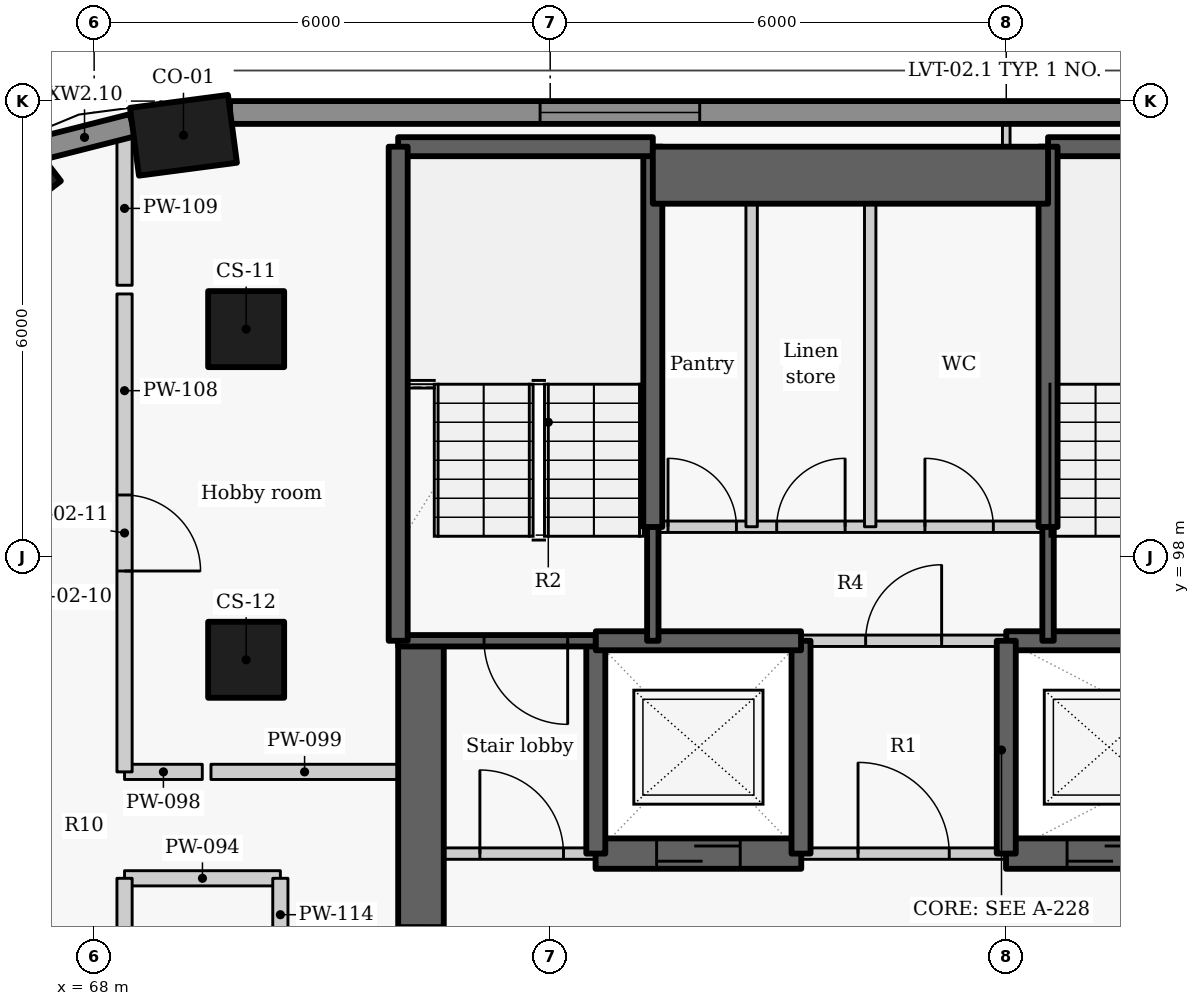
"""IFC4 building model, lengths in metres.
Left out: names, types, materials, properties, quantities, classifications, styles, units other than length and angle.
Written with IfcOpenShell. Run it as: python <this file> out.ifc"""

import sys

from ifc_helpers import new_model, si_unit, direction, frame, frame_2d, origin, origin_2d, place, context, subcontext, project, spatial, rectangle, extrude, element, fill, save


model = new_model("IFC4")
c1 = context("Model", 3, precision=1e-05, world=origin(), true_north=direction((0.0, 1.0)))
c2 = subcontext(c1, "Body", "Model", "MODEL_VIEW")
j1 = project(units=[si_unit("LENGTHUNIT", "METRE"), si_unit("PLANEANGLEUNIT", "RADIAN")], contexts=[c1])
p1 = place(None, origin())
s1 = spatial("IfcSite", under=j1, at=p1, CompositionType="ELEMENT")
p2 = place(p1, origin())
s2 = spatial("IfcBuilding", under=s1, at=p2, CompositionType="ELEMENT")
p3 = place(p2, frame((0.0, 0.0, 160.2)))
s3 = spatial("IfcBuildingStorey", under=s2, at=p3, CompositionType="ELEMENT", Elevation=160.2)
for number, where, z_axis, x_axis in (
    (1, (69.175, 103.55, 0.0), (0.0, 0.0, 1.0), (-0.991, -0.131, 0.0)),
    (2, (66.773, 102.91, 0.0), (0.0, 0.0, 1.0), (-0.793, -0.609, 0.0)),
):
    element("IfcColumn", number, at=place(p3, frame(where, z_axis=z_axis, x_axis=x_axis)), inside=s3, PredefinedType="COLUMN", context=c2, shape_type="SweptSolid", body=[
        extrude(rectangle(XDim=1.3, YDim=0.9, at=origin_2d()), origin(), (0.0, 0.0, 1.0), 3.3),
    ])
for number, where, z_axis, x_axis in (
    (3, (70.0, 101.0, 0.0), (0.0, 0.0, 1.0), (0.0, -1.0, 0.0)),
    (4, (70.0, 96.65, 0.0), (0.0, 0.0, 1.0), (0.0, -1.0, 0.0)),
):
    element("IfcColumn", number, at=place(p3, frame(where, z_axis=z_axis, x_axis=x_axis)), inside=s3, PredefinedType="COLUMN", context=c2, shape_type="SweptSolid", body=[
        extrude(rectangle(XDim=1.0, YDim=1.0, at=origin_2d()), origin(), (0.0, 0.0, 1.0), 3.3),
    ])
p4 = place(p3, frame((90.179, 103.85, 0.0), z_axis=(0.0, 0.0, 1.0), x_axis=(-1.0, 0.0, 0.0)))
e5 = element("IfcWall", 5, at=p4, inside=s3, PredefinedType="SOLIDWALL", context=c2, shape_type="SweptSolid", body=[
    extrude(rectangle(XDim=20.391, YDim=0.3, at=frame_2d((10.196, 0.0))), origin(), (0.0, 0.0, 1.0), 2.425),
])
p5 = place(p4, frame((4.051, 0.0, 0.9)))
e6 = element("IfcOpeningElement", 6, at=p5, cuts=e5, PredefinedType="OPENING", context=c2, shape_type="SweptSolid", body=[
    extrude(rectangle(XDim=2.1, YDim=1.1, at=frame_2d((1.05, 0.55))), frame((0.0, 0.16, 0.0), z_axis=(0.0, -1.0, 0.0), x_axis=(1.0, 0.0, 0.0)), (0.0, 0.0, 1.0), 0.32),
])
p6 = place(p4, frame((14.212, 0.0, 0.9)))
e7 = element("IfcOpeningElement", 7, at=p6, cuts=e5, PredefinedType="OPENING", context=c2, shape_type="SweptSolid", body=[
    extrude(rectangle(XDim=2.1, YDim=1.1, at=frame_2d((1.05, 0.55))), frame((0.0, 0.16, 0.0), z_axis=(0.0, -1.0, 0.0), x_axis=(1.0, 0.0, 0.0)), (0.0, 0.0, 1.0), 0.32),
])
p7 = place(p3, frame((68.506, 103.683, 0.0), z_axis=(0.0, 0.0, 1.0), x_axis=(-0.96924493129, -0.246098076322, 0.0)))
e8 = element("IfcWall", 8, at=p7, inside=s3, PredefinedType="SOLIDWALL", context=c2, shape_type="SweptSolid", body=[
    extrude(rectangle(XDim=1.305, YDim=0.3, at=frame_2d((0.653, 0.0))), origin(), (0.0, 0.0, 1.0), 2.425),
])
p8 = place(p3, frame((72.3, 87.8, -0.275), z_axis=(0.0, 0.0, 1.0), x_axis=(0.0, 1.0, 0.0)))
e9 = element("IfcWall", 9, at=p8, inside=s3, PredefinedType="SHEAR", context=c2, shape_type="SweptSolid", body=[
    extrude(rectangle(XDim=9.1, YDim=0.6, at=frame_2d((4.55, 0.0))), origin(), (0.0, 0.0, 1.0), 3.3),
])
p9 = place(p8, frame((3.852, 0.0, 0.275)))
e10 = element("IfcOpeningElement", 10, at=p9, cuts=e9, PredefinedType="OPENING", context=c2, shape_type="SweptSolid", body=[
    extrude(rectangle(XDim=1.5, YDim=2.1, at=frame_2d((0.75, 1.05))), frame((0.0, 0.31, 0.0), z_axis=(0.0, -1.0, 0.0), x_axis=(1.0, 0.0, 0.0)), (0.0, 0.0, 1.0), 0.62),
])
p10 = place(p3, frame((72.0, 94.1, 0.0), z_axis=(0.0, 0.0, 1.0), x_axis=(1.0, 0.0, 0.0)))
e11 = element("IfcWall", 11, at=p10, inside=s3, PredefinedType="PARTITIONING", context=c2, shape_type="SweptSolid", body=[
    extrude(rectangle(XDim=2.603, YDim=0.15, at=frame_2d((1.302, 0.0))), origin(), (0.0, 0.0, 1.0), 3.025),
])
p11 = place(p10, frame((1.075, 0.0, 0.0)))
e12 = element("IfcOpeningElement", 12, at=p11, cuts=e11, PredefinedType="OPENING", context=c2, shape_type="SweptSolid", body=[
    extrude(rectangle(XDim=1.1, YDim=2.1, at=frame_2d((0.55, 1.05))), frame((0.0, 0.085, 0.0), z_axis=(0.0, -1.0, 0.0), x_axis=(1.0, 0.0, 0.0)), (0.0, 0.0, 1.0), 0.17),
])
p12 = place(p3, frame((77.297, 94.1, 0.0), z_axis=(0.0, 0.0, 1.0), x_axis=(1.0, 0.0, 0.0)))
e13 = element("IfcWall", 13, at=p12, inside=s3, PredefinedType="PARTITIONING", context=c2, shape_type="SweptSolid", body=[
    extrude(rectangle(XDim=2.706, YDim=0.15, at=frame_2d((1.353, 0.0))), origin(), (0.0, 0.0, 1.0), 3.025),
])
p13 = place(p12, frame((0.753, 0.0, 0.0)))
e14 = element("IfcOpeningElement", 14, at=p13, cuts=e13, PredefinedType="OPENING", context=c2, shape_type="SweptSolid", body=[
    extrude(rectangle(XDim=1.2, YDim=2.1, at=frame_2d((0.6, 1.05))), frame((0.0, 0.085, 0.0), z_axis=(0.0, -1.0, 0.0), x_axis=(1.0, 0.0, 0.0)), (0.0, 0.0, 1.0), 0.17),
])
p14 = place(p3, frame((74.597, 94.1, -0.275), z_axis=(0.0, 0.0, 1.0), x_axis=(1.0, 0.0, 0.0)))
e15 = element("IfcWall", 15, at=p14, inside=s3, PredefinedType="SHEAR", context=c2, shape_type="SweptSolid", body=[
    extrude(rectangle(XDim=2.706, YDim=0.4, at=frame_2d((1.353, 0.0))), origin(), (0.0, 0.0, 1.0), 3.3),
])
p15 = place(p14, frame((0.803, 0.0, 0.275)))
e16 = element("IfcOpeningElement", 16, at=p15, cuts=e15, PredefinedType="OPENING", context=c2, shape_type="SweptSolid", body=[
    extrude(rectangle(XDim=1.1, YDim=2.1, at=frame_2d((0.55, 1.05))), frame((0.0, 0.21, 0.0), z_axis=(0.0, -1.0, 0.0), x_axis=(1.0, 0.0, 0.0)), (0.0, 0.0, 1.0), 0.42),
])
p16 = place(p3, frame((79.997, 94.1, -0.275), z_axis=(0.0, 0.0, 1.0), x_axis=(1.0, 0.0, 0.0)))
e17 = element("IfcWall", 17, at=p16, inside=s3, PredefinedType="SHEAR", context=c2, shape_type="SweptSolid", body=[
    extrude(rectangle(XDim=5.406, YDim=0.4, at=frame_2d((2.703, 0.0))), origin(), (0.0, 0.0, 1.0), 3.3),
])
p17 = place(p16, frame((0.803, 0.0, 0.275)))
e18 = element("IfcOpeningElement", 18, at=p17, cuts=e17, PredefinedType="OPENING", context=c2, shape_type="SweptSolid", body=[
    extrude(rectangle(XDim=1.1, YDim=2.1, at=frame_2d((0.55, 1.05))), frame((0.0, 0.21, 0.0), z_axis=(0.0, -1.0, 0.0), x_axis=(1.0, 0.0, 0.0)), (0.0, 0.0, 1.0), 0.42),
])
p18 = place(p3, frame((74.6, 94.1, -0.275), z_axis=(0.0, 0.0, 1.0), x_axis=(0.0, 1.0, 0.0)))
e19 = element("IfcWall", 19, at=p18, inside=s3, PredefinedType="SHEAR", context=c2, shape_type="SweptSolid", body=[
    extrude(rectangle(XDim=2.8, YDim=0.25, at=frame_2d((1.4, 0.0))), origin(), (0.0, 0.0, 1.0), 3.3),
])
p19 = place(p3, frame((74.6, 96.9, -0.275), z_axis=(0.0, 0.0, 1.0), x_axis=(-1.0, 0.0, 0.0)))
e20 = element("IfcWall", 20, at=p19, inside=s3, PredefinedType="SHEAR", context=c2, shape_type="SweptSolid", body=[
    extrude(rectangle(XDim=2.6, YDim=0.15, at=frame_2d((1.3, 0.0))), origin(), (0.0, 0.0, 1.0), 3.3),
])
p20 = place(p19, frame((0.37, 0.0, 0.275)))
e21 = element("IfcOpeningElement", 21, at=p20, cuts=e20, PredefinedType="OPENING", context=c2, shape_type="SweptSolid", body=[
    extrude(rectangle(XDim=1.1, YDim=2.1, at=frame_2d((0.55, 1.05))), frame((0.0, 0.085, 0.0), z_axis=(0.0, -1.0, 0.0), x_axis=(1.0, 0.0, 0.0)), (0.0, 0.0, 1.0), 0.17),
])
p21 = place(p3, frame((77.3, 94.1, -0.275), z_axis=(0.0, 0.0, 1.0), x_axis=(0.0, 1.0, 0.0)))
e22 = element("IfcWall", 22, at=p21, inside=s3, PredefinedType="SHEAR", context=c2, shape_type="SweptSolid", body=[
    extrude(rectangle(XDim=2.8, YDim=0.25, at=frame_2d((1.4, 0.0))), origin(), (0.0, 0.0, 1.0), 3.3),
])
p22 = place(p3, frame((74.6, 96.9, -0.275), z_axis=(0.0, 0.0, 1.0), x_axis=(1.0, 0.0, 0.0)))
e23 = element("IfcWall", 23, at=p22, inside=s3, PredefinedType="SHEAR", context=c2, shape_type="SweptSolid", body=[
    extrude(rectangle(XDim=2.7, YDim=0.25, at=frame_2d((1.35, 0.0))), origin(), (0.0, 0.0, 1.0), 3.3),
])
p23 = place(p3, frame((80.0, 96.9, -0.275), z_axis=(0.0, 0.0, 1.0), x_axis=(1.0, 0.0, 0.0)))
e24 = element("IfcWall", 24, at=p23, inside=s3, PredefinedType="SHEAR", context=c2, shape_type="SweptSolid", body=[
    extrude(rectangle(XDim=8.0, YDim=0.25, at=frame_2d((4.0, 0.0))), origin(), (0.0, 0.0, 1.0), 3.3),
])
p24 = place(p23, frame((3.849, 0.0, 0.275)))
e25 = element("IfcOpeningElement", 25, at=p24, cuts=e24, PredefinedType="OPENING", context=c2, shape_type="SweptSolid", body=[
    extrude(rectangle(XDim=1.1, YDim=2.1, at=frame_2d((0.55, 1.05))), frame((0.0, 0.135, 0.0), z_axis=(0.0, -1.0, 0.0), x_axis=(1.0, 0.0, 0.0)), (0.0, 0.0, 1.0), 0.27),
])
p25 = place(p3, frame((80.0, 94.1, -0.275), z_axis=(0.0, 0.0, 1.0), x_axis=(0.0, 1.0, 0.0)))
e26 = element("IfcWall", 26, at=p25, inside=s3, PredefinedType="SHEAR", context=c2, shape_type="SweptSolid", body=[
    extrude(rectangle(XDim=2.8, YDim=0.25, at=frame_2d((1.4, 0.0))), origin(), (0.0, 0.0, 1.0), 3.3),
])
p26 = place(p3, frame((77.3, 96.9, 0.0), z_axis=(0.0, 0.0, 1.0), x_axis=(1.0, 0.0, 0.0)))
e27 = element("IfcWall", 27, at=p26, inside=s3, PredefinedType="PARTITIONING", context=c2, shape_type="SweptSolid", body=[
    extrude(rectangle(XDim=2.7, YDim=0.15, at=frame_2d((1.35, 0.0))), origin(), (0.0, 0.0, 1.0), 3.025),
])
p27 = place(p26, frame((0.85, 0.0, 0.0)))
e28 = element("IfcOpeningElement", 28, at=p27, cuts=e27, PredefinedType="OPENING", context=c2, shape_type="SweptSolid", body=[
    extrude(rectangle(XDim=1.0, YDim=2.1, at=frame_2d((0.5, 1.05))), frame((0.0, 0.085, 0.0), z_axis=(0.0, -1.0, 0.0), x_axis=(1.0, 0.0, 0.0)), (0.0, 0.0, 1.0), 0.17),
])
p28 = place(p3, frame((75.35, 96.9, -0.275), z_axis=(0.0, 0.0, 1.0), x_axis=(0.0, 1.0, 0.0)))
e29 = element("IfcWall", 29, at=p28, inside=s3, PredefinedType="SHEAR", context=c2, shape_type="SweptSolid", body=[
    extrude(rectangle(XDim=1.503, YDim=0.15, at=frame_2d((0.751, 0.0))), origin(), (0.0, 0.0, 1.0), 3.3),
])
p29 = place(p3, frame((75.35, 98.397, -0.275), z_axis=(0.0, 0.0, 1.0), x_axis=(0.0, 1.0, 0.0)))
e30 = element("IfcWall", 30, at=p29, inside=s3, PredefinedType="SHEAR", context=c2, shape_type="SweptSolid", body=[
    extrude(rectangle(XDim=5.003, YDim=0.25, at=frame_2d((2.501, 0.0))), origin(), (0.0, 0.0, 1.0), 3.3),
])
p30 = place(p3, frame((72.0, 103.4, -0.275), z_axis=(0.0, 0.0, 1.0), x_axis=(1.0, 0.0, 0.0)))
e31 = element("IfcWall", 31, at=p30, inside=s3, PredefinedType="SHEAR", context=c2, shape_type="SweptSolid", body=[
    extrude(rectangle(XDim=3.35, YDim=0.25, at=frame_2d((1.675, 0.0))), origin(), (0.0, 0.0, 1.0), 3.3),
])
p31 = place(p3, frame((80.55, 103.4, -0.275), z_axis=(0.0, 0.0, 1.0), x_axis=(1.0, 0.0, 0.0)))
e32 = element("IfcWall", 32, at=p31, inside=s3, PredefinedType="SHEAR", context=c2, shape_type="SweptSolid", body=[
    extrude(rectangle(XDim=2.85, YDim=0.25, at=frame_2d((1.425, 0.0))), origin(), (0.0, 0.0, 1.0), 3.3),
])
p32 = place(p3, frame((72.0, 96.9, -0.275), z_axis=(0.0, 0.0, 1.0), x_axis=(0.0, 1.0, 0.0)))
e33 = element("IfcWall", 33, at=p32, inside=s3, PredefinedType="SHEAR", context=c2, shape_type="SweptSolid", body=[
    extrude(rectangle(XDim=6.5, YDim=0.25, at=frame_2d((3.25, 0.0))), origin(), (0.0, 0.0, 1.0), 3.3),
])
p33 = place(p3, frame((80.55, 96.9, -0.275), z_axis=(0.0, 0.0, 1.0), x_axis=(0.0, 1.0, 0.0)))
e34 = element("IfcWall", 34, at=p33, inside=s3, PredefinedType="SHEAR", context=c2, shape_type="SweptSolid", body=[
    extrude(rectangle(XDim=1.503, YDim=0.15, at=frame_2d((0.751, 0.0))), origin(), (0.0, 0.0, 1.0), 3.3),
])
p34 = place(p3, frame((80.55, 98.397, -0.275), z_axis=(0.0, 0.0, 1.0), x_axis=(0.0, 1.0, 0.0)))
e35 = element("IfcWall", 35, at=p34, inside=s3, PredefinedType="SHEAR", context=c2, shape_type="SweptSolid", body=[
    extrude(rectangle(XDim=5.003, YDim=0.25, at=frame_2d((2.501, 0.0))), origin(), (0.0, 0.0, 1.0), 3.3),
])
p35 = place(p3, frame((75.35, 103.025, -0.275), z_axis=(0.0, 0.0, 1.0), x_axis=(1.0, 0.0, 0.0)))
e36 = element("IfcWall", 36, at=p35, inside=s3, PredefinedType="SHEAR", context=c2, shape_type="SweptSolid", body=[
    extrude(rectangle(XDim=5.2, YDim=0.75, at=frame_2d((2.6, 0.0))), origin(), (0.0, 0.0, 1.0), 3.3),
])
p36 = place(p3, frame((75.35, 98.4, 0.0), z_axis=(0.0, 0.0, 1.0), x_axis=(1.0, 0.0, 0.0)))
e37 = element("IfcWall", 37, at=p36, inside=s3, PredefinedType="PARTITIONING", context=c2, shape_type="SweptSolid", body=[
    extrude(rectangle(XDim=5.2, YDim=0.15, at=frame_2d((2.6, 0.0))), origin(), (0.0, 0.0, 1.0), 3.025),
])
p37 = place(p36, frame((0.2, 0.0, 0.0)))
e38 = element("IfcOpeningElement", 38, at=p37, cuts=e37, PredefinedType="OPENING", context=c2, shape_type="SweptSolid", body=[
    extrude(rectangle(XDim=0.9, YDim=2.1, at=frame_2d((0.45, 1.05))), frame((0.0, 0.085, 0.0), z_axis=(0.0, -1.0, 0.0), x_axis=(1.0, 0.0, 0.0)), (0.0, 0.0, 1.0), 0.17),
])
p38 = place(p36, frame((1.63, 0.0, 0.0)))
e39 = element("IfcOpeningElement", 39, at=p38, cuts=e37, PredefinedType="OPENING", context=c2, shape_type="SweptSolid", body=[
    extrude(rectangle(XDim=0.9, YDim=2.1, at=frame_2d((0.45, 1.05))), frame((0.0, 0.085, 0.0), z_axis=(0.0, -1.0, 0.0), x_axis=(1.0, 0.0, 0.0)), (0.0, 0.0, 1.0), 0.17),
])
p39 = place(p36, frame((3.58, 0.0, 0.0)))
e40 = element("IfcOpeningElement", 40, at=p39, cuts=e37, PredefinedType="OPENING", context=c2, shape_type="SweptSolid", body=[
    extrude(rectangle(XDim=0.9, YDim=2.1, at=frame_2d((0.45, 1.05))), frame((0.0, 0.085, 0.0), z_axis=(0.0, -1.0, 0.0), x_axis=(1.0, 0.0, 0.0)), (0.0, 0.0, 1.0), 0.17),
])
for number, where, z_axis, x_axis in (
    (41, (76.65, 98.4, 0.0), (0.0, 0.0, 1.0), (0.0, 1.0, 0.0)),
    (42, (78.21, 98.4, 0.0), (0.0, 0.0, 1.0), (0.0, 1.0, 0.0)),
):
    element("IfcWall", number, at=place(p3, frame(where, z_axis=z_axis, x_axis=x_axis)), inside=s3, PredefinedType="PARTITIONING", context=c2, shape_type="SweptSolid", body=[
        extrude(rectangle(XDim=5.0, YDim=0.15, at=frame_2d((2.5, 0.0))), origin(), (0.0, 0.0, 1.0), 3.025),
    ])
p40 = place(p3, frame((68.4, 93.775, 0.0), z_axis=(0.0, 0.0, 1.0), x_axis=(1.0, 0.0, 0.0)))
e43 = element("IfcWall", 43, at=p40, inside=s3, PredefinedType="PARTITIONING", context=c2, shape_type="SweptSolid", body=[
    extrude(rectangle(XDim=2.05, YDim=0.2, at=frame_2d((1.025, 0.0))), origin(), (0.0, 0.0, 1.0), 2.505),
])
p41 = place(p3, frame((68.4, 95.175, 0.0), z_axis=(0.0, 0.0, 1.0), x_axis=(1.0, 0.0, 0.0)))
e44 = element("IfcWall", 44, at=p41, inside=s3, PredefinedType="PARTITIONING", context=c2, shape_type="SweptSolid", body=[
    extrude(rectangle(XDim=1.023, YDim=0.2, at=frame_2d((0.511, 0.0))), origin(), (0.0, 0.0, 1.0), 3.025),
])
p42 = place(p3, frame((69.537, 95.175, 0.0), z_axis=(0.0, 0.0, 1.0), x_axis=(1.0, 0.0, 0.0)))
e45 = element("IfcWall", 45, at=p42, inside=s3, PredefinedType="PARTITIONING", context=c2, shape_type="SweptSolid", body=[
    extrude(rectangle(XDim=2.463, YDim=0.2, at=frame_2d((1.231, 0.0))), origin(), (0.0, 0.0, 1.0), 2.505),
])
p43 = place(p3, frame((68.4, 88.527, 0.0), z_axis=(0.0, 0.0, 1.0), x_axis=(0.0, 1.0, 0.0)))
e46 = element("IfcWall", 46, at=p43, inside=s3, PredefinedType="PARTITIONING", context=c2, shape_type="SweptSolid", body=[
    extrude(rectangle(XDim=5.248, YDim=0.2, at=frame_2d((2.624, 0.0))), origin(), (0.0, 0.0, 1.0), 3.025),
])
p44 = place(p3, frame((68.4, 101.463, 0.0), z_axis=(0.0, 0.0, 1.0), x_axis=(0.0, -1.0, 0.0)))
e47 = element("IfcWall", 47, at=p44, inside=s3, PredefinedType="PARTITIONING", context=c2, shape_type="SweptSolid", body=[
    extrude(rectangle(XDim=6.288, YDim=0.2, at=frame_2d((3.144, 0.0))), origin(), (0.0, 0.0, 1.0), 3.025),
])
p45 = place(p44, frame((2.645, 0.0, 0.0)))
e48 = element("IfcOpeningElement", 48, at=p45, cuts=e47, PredefinedType="OPENING", context=c2, shape_type="SweptSolid", body=[
    extrude(rectangle(XDim=1.0, YDim=2.1, at=frame_2d((0.5, 1.05))), frame((0.0, 0.11, 0.0), z_axis=(0.0, -1.0, 0.0), x_axis=(1.0, 0.0, 0.0)), (0.0, 0.0, 1.0), 0.22),
])
p46 = place(p3, frame((68.4, 101.577, 0.0), z_axis=(0.0, 0.0, 1.0), x_axis=(0.0, 1.0, 0.0)))
e49 = element("IfcWall", 49, at=p46, inside=s3, PredefinedType="PARTITIONING", context=c2, shape_type="SweptSolid", body=[
    extrude(rectangle(XDim=2.022, YDim=0.2, at=frame_2d((1.011, 0.0))), origin(), (0.0, 0.0, 1.0), 2.405),
])
p47 = place(p3, frame((70.45, 92.817, 0.0), z_axis=(0.0, 0.0, 1.0), x_axis=(0.0, 1.0, 0.0)))
e50 = element("IfcWall", 50, at=p47, inside=s3, PredefinedType="PARTITIONING", context=c2, shape_type="SweptSolid", body=[
    extrude(rectangle(XDim=0.958, YDim=0.2, at=frame_2d((0.479, 0.0))), origin(), (0.0, 0.0, 1.0), 3.025),
])
p48 = place(p3, frame((80.0, 103.4, 0.0), z_axis=(0.0, 0.0, 1.0), x_axis=(0.0, 1.0, 0.0)))
e51 = element("IfcWall", 51, at=p48, inside=s3, PredefinedType="PARTITIONING", context=c2, shape_type="SweptSolid", body=[
    extrude(rectangle(XDim=0.3, YDim=0.1, at=frame_2d((0.15, 0.0))), origin(), (0.0, 0.0, 1.0), 3.025),
])
p49 = place(p6, origin())
e52 = element("IfcWindow", 52, at=p49, inside=s3, PartitioningType="SINGLE_PANEL", PredefinedType="WINDOW", context=c2, shape_type="SweptSolid", body=[
    extrude(rectangle(XDim=2.1, YDim=1.1, at=frame_2d((1.05, 0.55))), frame((0.0, 0.03, 0.0), z_axis=(0.0, -1.0, 0.0), x_axis=(1.0, 0.0, 0.0)), (0.0, 0.0, 1.0), 0.06),
])
fill(e7, e52)
p50 = place(p11, origin())
e53 = element("IfcDoor", 53, at=p50, inside=s3, OperationType="SINGLE_SWING_LEFT", PredefinedType="DOOR", context=c2, shape_type="SweptSolid", body=[
    extrude(rectangle(XDim=1.1, YDim=2.1, at=frame_2d((0.55, 1.05))), frame((0.0, 0.025, 0.0), z_axis=(0.0, -1.0, 0.0), x_axis=(1.0, 0.0, 0.0)), (0.0, 0.0, 1.0), 0.05),
])
fill(e12, e53)
p51 = place(p15, origin())
e54 = element("IfcDoor", 54, at=p51, inside=s3, OperationType="SLIDING_TO_LEFT", PredefinedType="DOOR", context=c2, shape_type="SweptSolid", body=[
    extrude(rectangle(XDim=1.1, YDim=2.1, at=frame_2d((0.55, 1.05))), frame((0.0, 0.025, 0.0), z_axis=(0.0, -1.0, 0.0), x_axis=(1.0, 0.0, 0.0)), (0.0, 0.0, 1.0), 0.05),
])
fill(e16, e54)
p52 = place(p13, origin())
e55 = element("IfcDoor", 55, at=p52, inside=s3, OperationType="DOUBLE_DOOR_SINGLE_SWING", PredefinedType="DOOR", context=c2, shape_type="SweptSolid", body=[
    extrude(rectangle(XDim=1.2, YDim=2.1, at=frame_2d((0.6, 1.05))), frame((0.0, 0.025, 0.0), z_axis=(0.0, -1.0, 0.0), x_axis=(1.0, 0.0, 0.0)), (0.0, 0.0, 1.0), 0.05),
])
fill(e14, e55)
p53 = place(p17, origin())
e56 = element("IfcDoor", 56, at=p53, inside=s3, OperationType="SLIDING_TO_LEFT", PredefinedType="DOOR", context=c2, shape_type="SweptSolid", body=[
    extrude(rectangle(XDim=1.1, YDim=2.1, at=frame_2d((0.55, 1.05))), frame((0.0, 0.025, 0.0), z_axis=(0.0, -1.0, 0.0), x_axis=(1.0, 0.0, 0.0)), (0.0, 0.0, 1.0), 0.05),
])
fill(e18, e56)
p54 = place(p27, origin())
e57 = element("IfcDoor", 57, at=p54, inside=s3, OperationType="SINGLE_SWING_RIGHT", PredefinedType="DOOR", context=c2, shape_type="SweptSolid", body=[
    extrude(rectangle(XDim=1.0, YDim=2.1, at=frame_2d((0.5, 1.05))), frame((0.0, 0.025, 0.0), z_axis=(0.0, -1.0, 0.0), x_axis=(1.0, 0.0, 0.0)), (0.0, 0.0, 1.0), 0.05),
])
fill(e28, e57)
p55 = place(p37, origin())
e58 = element("IfcDoor", 58, at=p55, inside=s3, OperationType="SINGLE_SWING_LEFT", PredefinedType="DOOR", context=c2, shape_type="SweptSolid", body=[
    extrude(rectangle(XDim=0.9, YDim=2.1, at=frame_2d((0.45, 1.05))), frame((0.0, 0.025, 0.0), z_axis=(0.0, -1.0, 0.0), x_axis=(1.0, 0.0, 0.0)), (0.0, 0.0, 1.0), 0.05),
])
fill(e38, e58)
p56 = place(p38, origin())
e59 = element("IfcDoor", 59, at=p56, inside=s3, OperationType="SINGLE_SWING_RIGHT", PredefinedType="DOOR", context=c2, shape_type="SweptSolid", body=[
    extrude(rectangle(XDim=0.9, YDim=2.1, at=frame_2d((0.45, 1.05))), frame((0.0, 0.025, 0.0), z_axis=(0.0, -1.0, 0.0), x_axis=(1.0, 0.0, 0.0)), (0.0, 0.0, 1.0), 0.05),
])
fill(e39, e59)
p57 = place(p39, origin())
e60 = element("IfcDoor", 60, at=p57, inside=s3, OperationType="SINGLE_SWING_LEFT", PredefinedType="DOOR", context=c2, shape_type="SweptSolid", body=[
    extrude(rectangle(XDim=0.9, YDim=2.1, at=frame_2d((0.45, 1.05))), frame((0.0, 0.025, 0.0), z_axis=(0.0, -1.0, 0.0), x_axis=(1.0, 0.0, 0.0)), (0.0, 0.0, 1.0), 0.05),
])
fill(e40, e60)
p58 = place(p20, origin())
e61 = element("IfcDoor", 61, at=p58, inside=s3, OperationType="SINGLE_SWING_LEFT", PredefinedType="DOOR", context=c2, shape_type="SweptSolid", body=[
    extrude(rectangle(XDim=1.1, YDim=2.1, at=frame_2d((0.55, 1.05))), frame((0.0, 0.025, 0.0), z_axis=(0.0, -1.0, 0.0), x_axis=(1.0, 0.0, 0.0)), (0.0, 0.0, 1.0), 0.05),
])
fill(e21, e61)
p59 = place(p45, origin())
e62 = element("IfcDoor", 62, at=p59, inside=s3, OperationType="SINGLE_SWING_RIGHT", PredefinedType="DOOR", context=c2, shape_type="SweptSolid", body=[
    extrude(rectangle(XDim=1.0, YDim=2.1, at=frame_2d((0.5, 1.05))), frame((0.0, 0.025, 0.0), z_axis=(0.0, -1.0, 0.0), x_axis=(1.0, 0.0, 0.0)), (0.0, 0.0, 1.0), 0.05),
])
fill(e48, e62)
p60 = place(p9, origin())
e63 = element("IfcDoor", 63, at=p60, inside=s3, OperationType="DOUBLE_DOOR_SINGLE_SWING", PredefinedType="DOOR", context=c2, shape_type="SweptSolid", body=[
    extrude(rectangle(XDim=1.5, YDim=2.1, at=frame_2d((0.75, 1.05))), frame((0.0, 0.025, 0.0), z_axis=(0.0, -1.0, 0.0), x_axis=(1.0, 0.0, 0.0)), (0.0, 0.0, 1.0), 0.05),
])
fill(e10, e63)
save(model, sys.argv[1])
